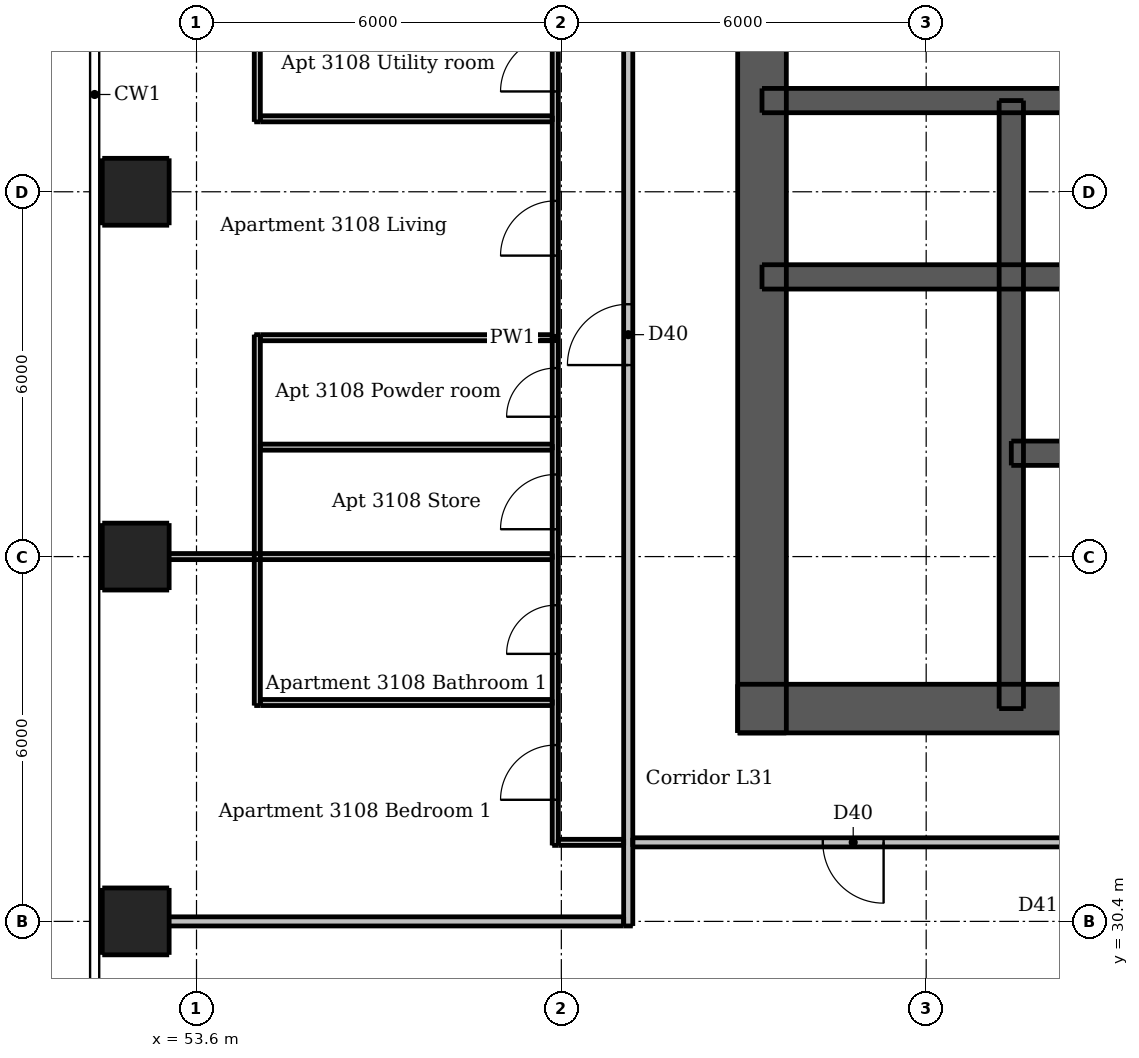
"""IFC4 building model, lengths in metres.
Left out: names, types, materials, properties, quantities, classifications, styles, units other than length and angle.
Written with IfcOpenShell. Run it as: python <this file> out.ifc"""

import sys

from ifc_helpers import new_model, si_unit, direction, frame, frame_2d, origin, origin_2d, place, context, subcontext, project, spatial, rectangle, extrude, element, fill, save


model = new_model("IFC4")
c1 = context("Model", 3, precision=1e-05, world=origin(), true_north=direction((0.0, 1.0)))
c2 = subcontext(c1, "Body", "Model", "MODEL_VIEW")
j1 = project(units=[si_unit("LENGTHUNIT", "METRE"), si_unit("PLANEANGLEUNIT", "RADIAN")], contexts=[c1])
p1 = place(None, origin())
s1 = spatial("IfcSite", under=j1, at=p1, CompositionType="ELEMENT")
p2 = place(p1, origin())
s2 = spatial("IfcBuilding", under=s1, at=p2, CompositionType="ELEMENT")
p3 = place(p2, frame((0.0, 0.0, 115.0)))
s3 = spatial("IfcBuildingStorey", under=s2, at=p3, CompositionType="ELEMENT", Elevation=115.0)
p4 = place(p3, frame((62.5, 33.9, 0.0), z_axis=(0.0, 0.0, 1.0), x_axis=(1.0, 0.0, 0.0)))
e1 = element("IfcWall", 1, at=p4, inside=s3, PredefinedType="SHEAR", context=c2, shape_type="SweptSolid", body=[
    extrude(rectangle(XDim=24.0, YDim=0.8, at=frame_2d((12.0, 0.0))), origin(), (0.0, 0.0, 1.0), 3.05),
])
p5 = place(p4, frame((2.0, 0.0, 0.0)))
e2 = element("IfcOpeningElement", 2, at=p5, cuts=e1, PredefinedType="OPENING", context=c2, shape_type="SweptSolid", body=[
    extrude(rectangle(XDim=1.1, YDim=2.1, at=frame_2d((0.55, 1.05))), frame((0.0, 0.41, 0.0), z_axis=(0.0, -1.0, 0.0), x_axis=(1.0, 0.0, 0.0)), (0.0, 0.0, 1.0), 0.82),
])
p6 = place(p4, frame((20.9, 0.0, 0.0)))
e3 = element("IfcOpeningElement", 3, at=p6, cuts=e1, PredefinedType="OPENING", context=c2, shape_type="SweptSolid", body=[
    extrude(rectangle(XDim=1.1, YDim=2.1, at=frame_2d((0.55, 1.05))), frame((0.0, 0.41, 0.0), z_axis=(0.0, -1.0, 0.0), x_axis=(1.0, 0.0, 0.0)), (0.0, 0.0, 1.0), 0.82),
])
p7 = place(p4, frame((8.0, 0.0, 0.0)))
e4 = element("IfcOpeningElement", 4, at=p7, cuts=e1, PredefinedType="OPENING", context=c2, shape_type="SweptSolid", body=[
    extrude(rectangle(XDim=1.1, YDim=2.1, at=frame_2d((0.55, 1.05))), frame((0.0, 0.41, 0.0), z_axis=(0.0, -1.0, 0.0), x_axis=(1.0, 0.0, 0.0)), (0.0, 0.0, 1.0), 0.82),
])
p8 = place(p4, frame((17.488, 0.0, 0.0)))
e5 = element("IfcOpeningElement", 5, at=p8, cuts=e1, PredefinedType="OPENING", context=c2, shape_type="SweptSolid", body=[
    extrude(rectangle(XDim=0.9, YDim=2.1, at=frame_2d((0.45, 1.05))), frame((0.0, 0.41, 0.0), z_axis=(0.0, -1.0, 0.0), x_axis=(1.0, 0.0, 0.0)), (0.0, 0.0, 1.0), 0.82),
])
p9 = place(p3, frame((62.9, 33.5, 0.0), z_axis=(0.0, 0.0, 1.0), x_axis=(0.0, 1.0, 0.0)))
e6 = element("IfcWall", 6, at=p9, inside=s3, PredefinedType="SHEAR", context=c2, shape_type="SweptSolid", body=[
    extrude(rectangle(XDim=24.0, YDim=0.8, at=frame_2d((12.0, 0.0))), origin(), (0.0, 0.0, 1.0), 3.05),
])
p10 = place(p9, frame((11.2, 0.0, 0.0)))
e7 = element("IfcOpeningElement", 7, at=p10, cuts=e6, PredefinedType="OPENING", context=c2, shape_type="SweptSolid", body=[
    extrude(rectangle(XDim=1.6, YDim=2.1, at=frame_2d((0.8, 1.05))), frame((0.0, 0.41, 0.0), z_axis=(0.0, -1.0, 0.0), x_axis=(1.0, 0.0, 0.0)), (0.0, 0.0, 1.0), 0.82),
])
p11 = place(p3, frame((62.9, 41.0, 0.0), z_axis=(0.0, 0.0, 1.0), x_axis=(1.0, 0.0, 0.0)))
e8 = element("IfcWall", 8, at=p11, inside=s3, PredefinedType="SHEAR", context=c2, shape_type="SweptSolid", body=[
    extrude(rectangle(XDim=23.2, YDim=0.4, at=frame_2d((11.6, 0.0))), origin(), (0.0, 0.0, 1.0), 3.05),
])
p12 = place(p3, frame((62.9, 43.9, 0.0), z_axis=(0.0, 0.0, 1.0), x_axis=(1.0, 0.0, 0.0)))
e9 = element("IfcWall", 9, at=p12, inside=s3, PredefinedType="SHEAR", context=c2, shape_type="SweptSolid", body=[
    extrude(rectangle(XDim=23.2, YDim=0.4, at=frame_2d((11.6, 0.0))), origin(), (0.0, 0.0, 1.0), 3.05),
])
p13 = place(p12, frame((1.7, 0.0, 0.0)))
e10 = element("IfcOpeningElement", 10, at=p13, cuts=e9, PredefinedType="OPENING", context=c2, shape_type="SweptSolid", body=[
    extrude(rectangle(XDim=0.9, YDim=2.1, at=frame_2d((0.45, 1.05))), frame((0.0, 0.21, 0.0), z_axis=(0.0, -1.0, 0.0), x_axis=(1.0, 0.0, 0.0)), (0.0, 0.0, 1.0), 0.42),
])
p14 = place(p12, frame((20.6, 0.0, 0.0)))
e11 = element("IfcOpeningElement", 11, at=p14, cuts=e9, PredefinedType="OPENING", context=c2, shape_type="SweptSolid", body=[
    extrude(rectangle(XDim=0.9, YDim=2.1, at=frame_2d((0.45, 1.05))), frame((0.0, 0.21, 0.0), z_axis=(0.0, -1.0, 0.0), x_axis=(1.0, 0.0, 0.0)), (0.0, 0.0, 1.0), 0.42),
])
p15 = place(p12, frame((4.8, 0.0, 0.0)))
e12 = element("IfcOpeningElement", 12, at=p15, cuts=e9, PredefinedType="OPENING", context=c2, shape_type="SweptSolid", body=[
    extrude(rectangle(XDim=1.1, YDim=2.1, at=frame_2d((0.55, 1.05))), frame((0.0, 0.21, 0.0), z_axis=(0.0, -1.0, 0.0), x_axis=(1.0, 0.0, 0.0)), (0.0, 0.0, 1.0), 0.42),
])
p16 = place(p12, frame((7.3, 0.0, 0.0)))
e13 = element("IfcOpeningElement", 13, at=p16, cuts=e9, PredefinedType="OPENING", context=c2, shape_type="SweptSolid", body=[
    extrude(rectangle(XDim=1.1, YDim=2.1, at=frame_2d((0.55, 1.05))), frame((0.0, 0.21, 0.0), z_axis=(0.0, -1.0, 0.0), x_axis=(1.0, 0.0, 0.0)), (0.0, 0.0, 1.0), 0.42),
])
p17 = place(p12, frame((9.8, 0.0, 0.0)))
e14 = element("IfcOpeningElement", 14, at=p17, cuts=e9, PredefinedType="OPENING", context=c2, shape_type="SweptSolid", body=[
    extrude(rectangle(XDim=1.1, YDim=2.1, at=frame_2d((0.55, 1.05))), frame((0.0, 0.21, 0.0), z_axis=(0.0, -1.0, 0.0), x_axis=(1.0, 0.0, 0.0)), (0.0, 0.0, 1.0), 0.42),
])
p18 = place(p12, frame((12.3, 0.0, 0.0)))
e15 = element("IfcOpeningElement", 15, at=p18, cuts=e9, PredefinedType="OPENING", context=c2, shape_type="SweptSolid", body=[
    extrude(rectangle(XDim=1.1, YDim=2.1, at=frame_2d((0.55, 1.05))), frame((0.0, 0.21, 0.0), z_axis=(0.0, -1.0, 0.0), x_axis=(1.0, 0.0, 0.0)), (0.0, 0.0, 1.0), 0.42),
])
p19 = place(p12, frame((14.8, 0.0, 0.0)))
e16 = element("IfcOpeningElement", 16, at=p19, cuts=e9, PredefinedType="OPENING", context=c2, shape_type="SweptSolid", body=[
    extrude(rectangle(XDim=1.1, YDim=2.1, at=frame_2d((0.55, 1.05))), frame((0.0, 0.21, 0.0), z_axis=(0.0, -1.0, 0.0), x_axis=(1.0, 0.0, 0.0)), (0.0, 0.0, 1.0), 0.42),
])
p20 = place(p12, frame((17.3, 0.0, 0.0)))
e17 = element("IfcOpeningElement", 17, at=p20, cuts=e9, PredefinedType="OPENING", context=c2, shape_type="SweptSolid", body=[
    extrude(rectangle(XDim=1.1, YDim=2.1, at=frame_2d((0.55, 1.05))), frame((0.0, 0.21, 0.0), z_axis=(0.0, -1.0, 0.0), x_axis=(1.0, 0.0, 0.0)), (0.0, 0.0, 1.0), 0.42),
])
p21 = place(p3, frame((67.0, 33.9, 0.0), z_axis=(0.0, 0.0, 1.0), x_axis=(0.0, 1.0, 0.0)))
e18 = element("IfcWall", 18, at=p21, inside=s3, PredefinedType="SHEAR", context=c2, shape_type="SweptSolid", body=[
    extrude(rectangle(XDim=10.0, YDim=0.4, at=frame_2d((5.0, 0.0))), origin(), (0.0, 0.0, 1.0), 3.05),
])
p22 = place(p21, frame((0.6, 0.0, 0.0)))
e19 = element("IfcOpeningElement", 19, at=p22, cuts=e18, PredefinedType="OPENING", context=c2, shape_type="SweptSolid", body=[
    extrude(rectangle(XDim=1.1, YDim=2.1, at=frame_2d((0.55, 1.05))), frame((0.0, 0.21, 0.0), z_axis=(0.0, -1.0, 0.0), x_axis=(1.0, 0.0, 0.0)), (0.0, 0.0, 1.0), 0.42),
])
p23 = place(p3, frame((67.0, 38.1, 0.0), z_axis=(0.0, 0.0, 1.0), x_axis=(1.0, 0.0, 0.0)))
e20 = element("IfcWall", 20, at=p23, inside=s3, PredefinedType="SHEAR", context=c2, shape_type="SweptSolid", body=[
    extrude(rectangle(XDim=7.5, YDim=0.4, at=frame_2d((3.75, 0.0))), origin(), (0.0, 0.0, 1.0), 3.05),
])
p24 = place(p23, frame((0.7, 0.0, 0.0)))
e21 = element("IfcOpeningElement", 21, at=p24, cuts=e20, PredefinedType="OPENING", context=c2, shape_type="SweptSolid", body=[
    extrude(rectangle(XDim=1.1, YDim=2.1, at=frame_2d((0.55, 1.05))), frame((0.0, 0.21, 0.0), z_axis=(0.0, -1.0, 0.0), x_axis=(1.0, 0.0, 0.0)), (0.0, 0.0, 1.0), 0.42),
])
p25 = place(p23, frame((3.2, 0.0, 0.0)))
e22 = element("IfcOpeningElement", 22, at=p25, cuts=e20, PredefinedType="OPENING", context=c2, shape_type="SweptSolid", body=[
    extrude(rectangle(XDim=1.1, YDim=2.1, at=frame_2d((0.55, 1.05))), frame((0.0, 0.21, 0.0), z_axis=(0.0, -1.0, 0.0), x_axis=(1.0, 0.0, 0.0)), (0.0, 0.0, 1.0), 0.42),
])
p26 = place(p23, frame((5.65, 0.0, 0.0)))
e23 = element("IfcOpeningElement", 23, at=p26, cuts=e20, PredefinedType="OPENING", context=c2, shape_type="SweptSolid", body=[
    extrude(rectangle(XDim=1.2, YDim=2.1, at=frame_2d((0.6, 1.05))), frame((0.0, 0.21, 0.0), z_axis=(0.0, -1.0, 0.0), x_axis=(1.0, 0.0, 0.0)), (0.0, 0.0, 1.0), 0.42),
])
for number, where, z_axis, x_axis in (
    (24, (52.6, 30.4, 0.0), (0.0, 0.0, 1.0), (1.0, 0.0, 0.0)),
    (25, (52.6, 36.4, 0.0), (0.0, 0.0, 1.0), (1.0, 0.0, 0.0)),
    (26, (52.6, 42.4, 0.0), (0.0, 0.0, 1.0), (1.0, 0.0, 0.0)),
):
    element("IfcColumn", number, at=place(p3, frame(where, z_axis=z_axis, x_axis=x_axis)), inside=s3, PredefinedType="COLUMN", context=c2, shape_type="SweptSolid", body=[
        extrude(rectangle(XDim=1.1, YDim=1.1, at=origin_2d()), origin(), (0.0, 0.0, 1.0), 3.05),
    ])
p27 = place(p3, frame((54.6, 33.95, 0.0), z_axis=(0.0, 0.0, 1.0), x_axis=(0.0, 1.0, 0.0)))
e27 = element("IfcWall", 27, at=p27, inside=s3, PredefinedType="PARTITIONING", context=c2, shape_type="SweptSolid", body=[
    extrude(rectangle(XDim=6.1, YDim=0.1, at=frame_2d((3.05, 0.0))), origin(), (0.0, 0.0, 1.0), 3.05),
])
p28 = place(p3, frame((54.6, 43.55, 0.0), z_axis=(0.0, 0.0, 1.0), x_axis=(0.0, 1.0, 0.0)))
e28 = element("IfcWall", 28, at=p28, inside=s3, PredefinedType="PARTITIONING", context=c2, shape_type="SweptSolid", body=[
    extrude(rectangle(XDim=4.775, YDim=0.1, at=frame_2d((2.387, 0.0))), origin(), (0.0, 0.0, 1.0), 3.05),
])
p29 = place(p3, frame((59.5, 31.65, 0.0), z_axis=(0.0, 0.0, 1.0), x_axis=(0.0, 1.0, 0.0)))
e29 = element("IfcWall", 29, at=p29, inside=s3, PredefinedType="PARTITIONING", context=c2, shape_type="SweptSolid", body=[
    extrude(rectangle(XDim=16.675, YDim=0.1, at=frame_2d((8.337, 0.0))), origin(), (0.0, 0.0, 1.0), 2.51),
])
p30 = place(p29, frame((9.7, 0.0, 0.0)))
e30 = element("IfcOpeningElement", 30, at=p30, cuts=e29, PredefinedType="OPENING", context=c2, shape_type="SweptSolid", body=[
    extrude(rectangle(XDim=0.9, YDim=2.1, at=frame_2d((0.45, 1.05))), frame((0.0, 0.06, 0.0), z_axis=(0.0, -1.0, 0.0), x_axis=(1.0, 0.0, 0.0)), (0.0, 0.0, 1.0), 0.12),
])
p31 = place(p29, frame((14.8, 0.0, 0.0)))
e31 = element("IfcOpeningElement", 31, at=p31, cuts=e29, PredefinedType="OPENING", context=c2, shape_type="SweptSolid", body=[
    extrude(rectangle(XDim=0.9, YDim=2.1, at=frame_2d((0.45, 1.05))), frame((0.0, 0.06, 0.0), z_axis=(0.0, -1.0, 0.0), x_axis=(1.0, 0.0, 0.0)), (0.0, 0.0, 1.0), 0.12),
])
p32 = place(p29, frame((12.4, 0.0, 0.0)))
e32 = element("IfcOpeningElement", 32, at=p32, cuts=e29, PredefinedType="OPENING", context=c2, shape_type="SweptSolid", body=[
    extrude(rectangle(XDim=0.9, YDim=2.1, at=frame_2d((0.45, 1.05))), frame((0.0, 0.06, 0.0), z_axis=(0.0, -1.0, 0.0), x_axis=(1.0, 0.0, 0.0)), (0.0, 0.0, 1.0), 0.12),
])
p33 = place(p29, frame((5.2, 0.0, 0.0)))
e33 = element("IfcOpeningElement", 33, at=p33, cuts=e29, PredefinedType="OPENING", context=c2, shape_type="SweptSolid", body=[
    extrude(rectangle(XDim=0.9, YDim=2.1, at=frame_2d((0.45, 1.05))), frame((0.0, 0.06, 0.0), z_axis=(0.0, -1.0, 0.0), x_axis=(1.0, 0.0, 0.0)), (0.0, 0.0, 1.0), 0.12),
])
p34 = place(p29, frame((7.05, 0.0, 0.0)))
e34 = element("IfcOpeningElement", 34, at=p34, cuts=e29, PredefinedType="OPENING", context=c2, shape_type="SweptSolid", body=[
    extrude(rectangle(XDim=0.8, YDim=2.1, at=frame_2d((0.4, 1.05))), frame((0.0, 0.06, 0.0), z_axis=(0.0, -1.0, 0.0), x_axis=(1.0, 0.0, 0.0)), (0.0, 0.0, 1.0), 0.12),
])
p35 = place(p29, frame((0.75, 0.0, 0.0)))
e35 = element("IfcOpeningElement", 35, at=p35, cuts=e29, PredefinedType="OPENING", context=c2, shape_type="SweptSolid", body=[
    extrude(rectangle(XDim=0.9, YDim=2.1, at=frame_2d((0.45, 1.05))), frame((0.0, 0.06, 0.0), z_axis=(0.0, -1.0, 0.0), x_axis=(1.0, 0.0, 0.0)), (0.0, 0.0, 1.0), 0.12),
])
p36 = place(p29, frame((3.15, 0.0, 0.0)))
e36 = element("IfcOpeningElement", 36, at=p36, cuts=e29, PredefinedType="OPENING", context=c2, shape_type="SweptSolid", body=[
    extrude(rectangle(XDim=0.8, YDim=2.1, at=frame_2d((0.4, 1.05))), frame((0.0, 0.06, 0.0), z_axis=(0.0, -1.0, 0.0), x_axis=(1.0, 0.0, 0.0)), (0.0, 0.0, 1.0), 0.12),
])
for number, where, z_axis, x_axis in (
    (37, (54.65, 43.6, 0.0), (0.0, 0.0, 1.0), (1.0, 0.0, 0.0)),
    (38, (54.65, 40.0, 0.0), (0.0, 0.0, 1.0), (1.0, 0.0, 0.0)),
    (39, (54.65, 38.2, 0.0), (0.0, 0.0, 1.0), (1.0, 0.0, 0.0)),
):
    element("IfcWall", number, at=place(p3, frame(where, z_axis=z_axis, x_axis=x_axis)), inside=s3, PredefinedType="PARTITIONING", context=c2, shape_type="SweptSolid", body=[
        extrude(rectangle(XDim=4.8, YDim=0.1, at=frame_2d((2.4, 0.0))), origin(), (0.0, 0.0, 1.0), 3.05),
    ])
p37 = place(p3, frame((52.0, 36.4, 0.0), z_axis=(0.0, 0.0, 1.0), x_axis=(1.0, 0.0, 0.0)))
e40 = element("IfcWall", 40, at=p37, inside=s3, PredefinedType="PARTITIONING", context=c2, shape_type="SweptSolid", body=[
    extrude(rectangle(XDim=7.45, YDim=0.1, at=frame_2d((3.725, 0.0))), origin(), (0.0, 0.0, 1.0), 2.516),
])
p38 = place(p3, frame((54.65, 34.0, 0.0), z_axis=(0.0, 0.0, 1.0), x_axis=(1.0, 0.0, 0.0)))
e41 = element("IfcWall", 41, at=p38, inside=s3, PredefinedType="PARTITIONING", context=c2, shape_type="SweptSolid", body=[
    extrude(rectangle(XDim=4.8, YDim=0.1, at=frame_2d((2.4, 0.0))), origin(), (0.0, 0.0, 1.0), 3.05),
])
p39 = place(p3, frame((59.55, 31.7, 0.0), z_axis=(0.0, 0.0, 1.0), x_axis=(1.0, 0.0, 0.0)))
e42 = element("IfcWall", 42, at=p39, inside=s3, PredefinedType="PARTITIONING", context=c2, shape_type="SweptSolid", body=[
    extrude(rectangle(XDim=1.075, YDim=0.1, at=frame_2d((0.538, 0.0))), origin(), (0.0, 0.0, 1.0), 3.05),
])
p40 = place(p3, frame((60.7, 30.325, 0.0), z_axis=(0.0, 0.0, 1.0), x_axis=(0.0, 1.0, 0.0)))
e43 = element("IfcWall", 43, at=p40, inside=s3, PredefinedType="PARTITIONING", context=c2, shape_type="SweptSolid", body=[
    extrude(rectangle(XDim=28.9, YDim=0.15, at=frame_2d((14.45, 0.0))), origin(), (0.0, 0.0, 1.0), 3.05),
])
p41 = place(p40, frame((9.225, 0.0, 0.0)))
e44 = element("IfcOpeningElement", 44, at=p41, cuts=e43, PredefinedType="OPENING", context=c2, shape_type="SweptSolid", body=[
    extrude(rectangle(XDim=1.0, YDim=2.1, at=frame_2d((0.5, 1.05))), frame((0.0, 0.085, 0.0), z_axis=(0.0, -1.0, 0.0), x_axis=(1.0, 0.0, 0.0)), (0.0, 0.0, 1.0), 0.17),
])
p42 = place(p40, frame((26.025, 0.0, 0.0)))
e45 = element("IfcOpeningElement", 45, at=p42, cuts=e43, PredefinedType="OPENING", context=c2, shape_type="SweptSolid", body=[
    extrude(rectangle(XDim=1.0, YDim=2.1, at=frame_2d((0.5, 1.05))), frame((0.0, 0.085, 0.0), z_axis=(0.0, -1.0, 0.0), x_axis=(1.0, 0.0, 0.0)), (0.0, 0.0, 1.0), 0.17),
])
p43 = place(p3, frame((89.525, 31.7, 0.0), z_axis=(0.0, 0.0, 1.0), x_axis=(-1.0, 0.0, 0.0)))
e46 = element("IfcWall", 46, at=p43, inside=s3, PredefinedType="PARTITIONING", context=c2, shape_type="SweptSolid", body=[
    extrude(rectangle(XDim=28.75, YDim=0.15, at=frame_2d((14.375, 0.0))), origin(), (0.0, 0.0, 1.0), 3.05),
])
p44 = place(p43, frame((24.625, 0.0, 0.0)))
e47 = element("IfcOpeningElement", 47, at=p44, cuts=e46, PredefinedType="OPENING", context=c2, shape_type="SweptSolid", body=[
    extrude(rectangle(XDim=1.0, YDim=2.1, at=frame_2d((0.5, 1.05))), frame((0.0, 0.085, 0.0), z_axis=(0.0, -1.0, 0.0), x_axis=(1.0, 0.0, 0.0)), (0.0, 0.0, 1.0), 0.17),
])
p45 = place(p43, frame((5.425, 0.0, 0.0)))
e48 = element("IfcOpeningElement", 48, at=p45, cuts=e46, PredefinedType="OPENING", context=c2, shape_type="SweptSolid", body=[
    extrude(rectangle(XDim=1.0, YDim=2.1, at=frame_2d((0.5, 1.05))), frame((0.0, 0.085, 0.0), z_axis=(0.0, -1.0, 0.0), x_axis=(1.0, 0.0, 0.0)), (0.0, 0.0, 1.0), 0.17),
])
p46 = place(p3, frame((52.0, 30.4, 0.0), z_axis=(0.0, 0.0, 1.0), x_axis=(1.0, 0.0, 0.0)))
e49 = element("IfcWall", 49, at=p46, inside=s3, PredefinedType="PARTITIONING", context=c2, shape_type="SweptSolid", body=[
    extrude(rectangle(XDim=8.625, YDim=0.15, at=frame_2d((4.312, 0.0))), origin(), (0.0, 0.0, 1.0), 2.647),
])
p47 = place(p5, origin())
e50 = element("IfcDoor", 50, at=p47, inside=s3, OperationType="SINGLE_SWING_LEFT", PredefinedType="DOOR", context=c2, shape_type="SweptSolid", body=[
    extrude(rectangle(XDim=1.1, YDim=2.1, at=frame_2d((0.55, 1.05))), frame((0.0, 0.388, 0.0), z_axis=(0.0, -1.0, 0.0), x_axis=(1.0, 0.0, 0.0)), (0.0, 0.0, 1.0), 0.05),
])
fill(e2, e50)
p48 = place(p22, origin())
e51 = element("IfcDoor", 51, at=p48, inside=s3, OperationType="SINGLE_SWING_RIGHT", PredefinedType="DOOR", context=c2, shape_type="SweptSolid", body=[
    extrude(rectangle(XDim=1.1, YDim=2.1, at=frame_2d((0.55, 1.05))), frame((0.0, -0.138, 0.0), z_axis=(0.0, -1.0, 0.0), x_axis=(1.0, 0.0, 0.0)), (0.0, 0.0, 1.0), 0.05),
])
fill(e19, e51)
p49 = place(p13, origin())
e52 = element("IfcDoor", 52, at=p49, inside=s3, OperationType="SINGLE_SWING_LEFT", PredefinedType="DOOR", context=c2, shape_type="SweptSolid", body=[
    extrude(rectangle(XDim=0.9, YDim=2.1, at=frame_2d((0.45, 1.05))), frame((0.0, -0.138, 0.0), z_axis=(0.0, -1.0, 0.0), x_axis=(1.0, 0.0, 0.0)), (0.0, 0.0, 1.0), 0.05),
])
fill(e10, e52)
p50 = place(p15, origin())
e53 = element("IfcDoor", 53, at=p50, inside=s3, OperationType="DOUBLE_DOOR_SLIDING", PredefinedType="DOOR", context=c2, shape_type="SweptSolid", body=[
    extrude(rectangle(XDim=1.1, YDim=2.1, at=frame_2d((0.55, 1.05))), frame((0.0, 0.025, 0.0), z_axis=(0.0, -1.0, 0.0), x_axis=(1.0, 0.0, 0.0)), (0.0, 0.0, 1.0), 0.05),
])
fill(e12, e53)
p51 = place(p24, origin())
e54 = element("IfcDoor", 54, at=p51, inside=s3, OperationType="DOUBLE_DOOR_SLIDING", PredefinedType="DOOR", context=c2, shape_type="SweptSolid", body=[
    extrude(rectangle(XDim=1.1, YDim=2.1, at=frame_2d((0.55, 1.05))), frame((0.0, 0.025, 0.0), z_axis=(0.0, -1.0, 0.0), x_axis=(1.0, 0.0, 0.0)), (0.0, 0.0, 1.0), 0.05),
])
fill(e21, e54)
p52 = place(p44, origin())
e55 = element("IfcDoor", 55, at=p52, inside=s3, OperationType="SINGLE_SWING_LEFT", PredefinedType="DOOR", context=c2, shape_type="SweptSolid", body=[
    extrude(rectangle(XDim=1.0, YDim=2.1, at=frame_2d((0.5, 1.05))), frame((0.0, 0.025, 0.0), z_axis=(0.0, -1.0, 0.0), x_axis=(1.0, 0.0, 0.0)), (0.0, 0.0, 1.0), 0.05),
])
fill(e47, e55)
p53 = place(p41, origin())
e56 = element("IfcDoor", 56, at=p53, inside=s3, OperationType="SINGLE_SWING_LEFT", PredefinedType="DOOR", context=c2, shape_type="SweptSolid", body=[
    extrude(rectangle(XDim=1.0, YDim=2.1, at=frame_2d((0.5, 1.05))), frame((0.0, 0.025, 0.0), z_axis=(0.0, -1.0, 0.0), x_axis=(1.0, 0.0, 0.0)), (0.0, 0.0, 1.0), 0.05),
])
fill(e44, e56)
p54 = place(p30, origin())
e57 = element("IfcDoor", 57, at=p54, inside=s3, OperationType="SINGLE_SWING_LEFT", PredefinedType="DOOR", context=c2, shape_type="SweptSolid", body=[
    extrude(rectangle(XDim=0.9, YDim=2.1, at=frame_2d((0.45, 1.05))), frame((0.0, 0.025, 0.0), z_axis=(0.0, -1.0, 0.0), x_axis=(1.0, 0.0, 0.0)), (0.0, 0.0, 1.0), 0.05),
])
fill(e30, e57)
p55 = place(p32, origin())
e58 = element("IfcDoor", 58, at=p55, inside=s3, OperationType="SINGLE_SWING_LEFT", PredefinedType="DOOR", context=c2, shape_type="SweptSolid", body=[
    extrude(rectangle(XDim=0.9, YDim=2.1, at=frame_2d((0.45, 1.05))), frame((0.0, 0.025, 0.0), z_axis=(0.0, -1.0, 0.0), x_axis=(1.0, 0.0, 0.0)), (0.0, 0.0, 1.0), 0.05),
])
fill(e32, e58)
p56 = place(p33, origin())
e59 = element("IfcDoor", 59, at=p56, inside=s3, OperationType="SINGLE_SWING_LEFT", PredefinedType="DOOR", context=c2, shape_type="SweptSolid", body=[
    extrude(rectangle(XDim=0.9, YDim=2.1, at=frame_2d((0.45, 1.05))), frame((0.0, 0.025, 0.0), z_axis=(0.0, -1.0, 0.0), x_axis=(1.0, 0.0, 0.0)), (0.0, 0.0, 1.0), 0.05),
])
fill(e33, e59)
p57 = place(p34, origin())
e60 = element("IfcDoor", 60, at=p57, inside=s3, OperationType="SINGLE_SWING_LEFT", PredefinedType="DOOR", context=c2, shape_type="SweptSolid", body=[
    extrude(rectangle(XDim=0.8, YDim=2.1, at=frame_2d((0.4, 1.05))), frame((0.0, 0.025, 0.0), z_axis=(0.0, -1.0, 0.0), x_axis=(1.0, 0.0, 0.0)), (0.0, 0.0, 1.0), 0.05),
])
fill(e34, e60)
p58 = place(p35, origin())
e61 = element("IfcDoor", 61, at=p58, inside=s3, OperationType="SINGLE_SWING_LEFT", PredefinedType="DOOR", context=c2, shape_type="SweptSolid", body=[
    extrude(rectangle(XDim=0.9, YDim=2.1, at=frame_2d((0.45, 1.05))), frame((0.0, 0.025, 0.0), z_axis=(0.0, -1.0, 0.0), x_axis=(1.0, 0.0, 0.0)), (0.0, 0.0, 1.0), 0.05),
])
fill(e35, e61)
p59 = place(p36, origin())
e62 = element("IfcDoor", 62, at=p59, inside=s3, OperationType="SINGLE_SWING_LEFT", PredefinedType="DOOR", context=c2, shape_type="SweptSolid", body=[
    extrude(rectangle(XDim=0.8, YDim=2.1, at=frame_2d((0.4, 1.05))), frame((0.0, 0.025, 0.0), z_axis=(0.0, -1.0, 0.0), x_axis=(1.0, 0.0, 0.0)), (0.0, 0.0, 1.0), 0.05),
])
fill(e36, e62)
save(model, sys.argv[1])
